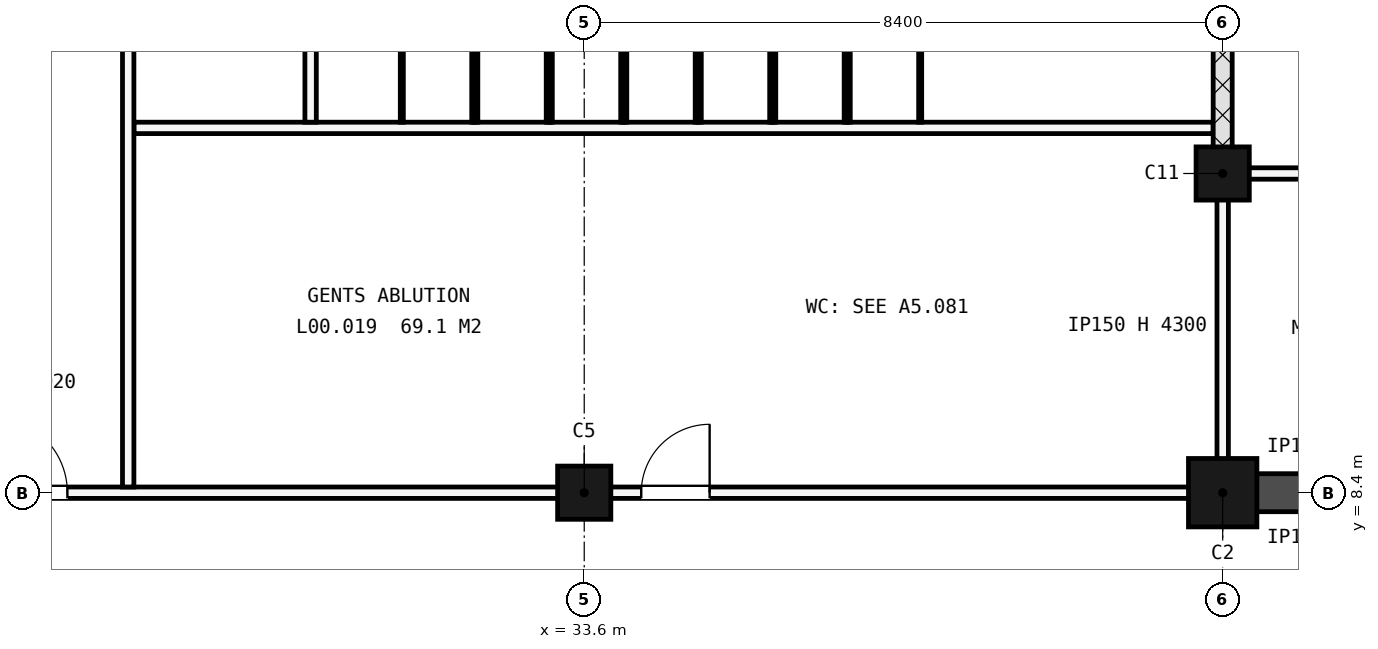
"""IFC4 building model, lengths in metres.
Left out: names, types, materials, properties, quantities, classifications, styles, units other than length and angle.
Written with IfcOpenShell. Run it as: python <this file> out.ifc"""

import sys

from ifc_helpers import new_model, si_unit, direction, frame, frame_2d, origin, origin_2d, place, context, subcontext, project, spatial, rectangle, circle, extrude, element, fill, save


model = new_model("IFC4")
c1 = context("Model", 3, precision=1e-05, world=origin(), true_north=direction((0.0, 1.0)))
c2 = subcontext(c1, "Body", "Model", "MODEL_VIEW")
j1 = project(units=[si_unit("LENGTHUNIT", "METRE"), si_unit("PLANEANGLEUNIT", "RADIAN")], contexts=[c1])
p1 = place(None, origin())
s1 = spatial("IfcSite", under=j1, at=p1, CompositionType="ELEMENT")
p2 = place(p1, origin())
s2 = spatial("IfcBuilding", under=s1, at=p2, CompositionType="ELEMENT")
p3 = place(p2, origin())
s3 = spatial("IfcBuildingStorey", under=s2, at=p3, CompositionType="ELEMENT", Elevation=0.0)
p4 = place(p3, frame((33.6, 8.4, -0.3), z_axis=(0.0, 0.0, 1.0), x_axis=(1.0, 0.0, 0.0)))
e1 = element("IfcColumn", 1, at=p4, inside=s3, PredefinedType="COLUMN", context=c2, shape_type="SweptSolid", body=[
    extrude(rectangle(XDim=0.7, YDim=0.7, at=origin_2d()), origin(), (0.0, 0.0, 1.0), 5.4),
])
p5 = place(p3, frame((42.0, 8.4, -0.3), z_axis=(0.0, 0.0, 1.0), x_axis=(1.0, 0.0, 0.0)))
e2 = element("IfcColumn", 2, at=p5, inside=s3, PredefinedType="COLUMN", context=c2, shape_type="SweptSolid", body=[
    extrude(rectangle(XDim=0.9, YDim=0.9, at=origin_2d()), origin(), (0.0, 0.0, 1.0), 5.4),
])
p6 = place(p3, frame((42.0, 12.6, -0.3), z_axis=(0.0, 0.0, 1.0), x_axis=(1.0, 0.0, 0.0)))
e3 = element("IfcColumn", 3, at=p6, inside=s3, PredefinedType="COLUMN", context=c2, shape_type="SweptSolid", body=[
    extrude(circle(Radius=0.35, at=origin_2d()), origin(), (0.0, 0.0, 1.0), 5.4),
])
p7 = place(p3, frame((42.0, 8.4, -0.3), z_axis=(0.0, 0.0, 1.0), x_axis=(1.0, 0.0, 0.0)))
e4 = element("IfcWall", 4, at=p7, inside=s3, PredefinedType="SHEAR", context=c2, shape_type="SweptSolid", body=[
    extrude(rectangle(XDim=42.0, YDim=0.5, at=frame_2d((21.0, 0.0))), origin(), (0.0, 0.0, 1.0), 5.4),
])
p8 = place(p7, frame((20.6, 0.0, 0.3)))
e5 = element("IfcOpeningElement", 5, at=p8, cuts=e4, PredefinedType="OPENING", context=c2, shape_type="SweptSolid", body=[
    extrude(rectangle(XDim=1.0, YDim=2.1, at=frame_2d((0.5, 1.05))), frame((0.0, 0.26, 0.0), z_axis=(0.0, -1.0, 0.0), x_axis=(1.0, 0.0, 0.0)), (0.0, 0.0, 1.0), 0.52),
])
p9 = place(p3, frame((25.2, 8.4, 0.0), z_axis=(0.0, 0.0, 1.0), x_axis=(1.0, 0.0, 0.0)))
e6 = element("IfcWall", 6, at=p9, inside=s3, PredefinedType="PARTITIONING", context=c2, shape_type="SweptSolid", body=[
    extrude(rectangle(XDim=16.875, YDim=0.15, at=frame_2d((8.438, 0.0))), origin(), (0.0, 0.0, 1.0), 4.3),
])
p10 = place(p9, frame((9.15, 0.0, 0.0)))
e7 = element("IfcOpeningElement", 7, at=p10, cuts=e6, PredefinedType="OPENING", context=c2, shape_type="SweptSolid", body=[
    extrude(rectangle(XDim=0.9, YDim=2.1, at=frame_2d((0.45, 1.05))), frame((0.0, 0.085, 0.0), z_axis=(0.0, -1.0, 0.0), x_axis=(1.0, 0.0, 0.0)), (0.0, 0.0, 1.0), 0.17),
])
p11 = place(p9, frame((0.6, 0.0, 0.0)))
e8 = element("IfcOpeningElement", 8, at=p11, cuts=e6, PredefinedType="OPENING", context=c2, shape_type="SweptSolid", body=[
    extrude(rectangle(XDim=1.0, YDim=2.1, at=frame_2d((0.5, 1.05))), frame((0.0, 0.085, 0.0), z_axis=(0.0, -1.0, 0.0), x_axis=(1.0, 0.0, 0.0)), (0.0, 0.0, 1.0), 0.17),
])
p12 = place(p3, frame((41.875, 12.6, 0.0), z_axis=(0.0, 0.0, 1.0), x_axis=(1.0, 0.0, 0.0)))
e9 = element("IfcWall", 9, at=p12, inside=s3, PredefinedType="PARTITIONING", context=c2, shape_type="SweptSolid", body=[
    extrude(rectangle(XDim=42.025, YDim=0.15, at=frame_2d((21.012, 0.0))), origin(), (0.0, 0.0, 1.0), 4.2),
])
p13 = place(p12, frame((19.925, 0.0, 0.0)))
e10 = element("IfcOpeningElement", 10, at=p13, cuts=e9, PredefinedType="OPENING", context=c2, shape_type="SweptSolid", body=[
    extrude(rectangle(XDim=2.4, YDim=2.1, at=frame_2d((1.2, 1.05))), frame((0.0, 0.085, 0.0), z_axis=(0.0, -1.0, 0.0), x_axis=(1.0, 0.0, 0.0)), (0.0, 0.0, 1.0), 0.17),
])
p14 = place(p3, frame((27.675, 13.2, 0.0), z_axis=(0.0, 0.0, 1.0), x_axis=(1.0, 0.0, 0.0)))
e11 = element("IfcWall", 11, at=p14, inside=s3, PredefinedType="PARTITIONING", context=c2, shape_type="SweptSolid", body=[
    extrude(rectangle(XDim=14.2, YDim=0.15, at=frame_2d((7.1, 0.0))), origin(), (0.0, 0.0, 1.0), 5.1),
])
p15 = place(p3, frame((27.6, 8.475, 0.0), z_axis=(0.0, 0.0, 1.0), x_axis=(0.0, 1.0, 0.0)))
e12 = element("IfcWall", 12, at=p15, inside=s3, PredefinedType="PARTITIONING", context=c2, shape_type="SweptSolid", body=[
    extrude(rectangle(XDim=16.825, YDim=0.15, at=frame_2d((8.413, 0.0))), origin(), (0.0, 0.0, 1.0), 5.1),
])
p16 = place(p15, frame((10.225, 0.0, 0.0)))
e13 = element("IfcOpeningElement", 13, at=p16, cuts=e12, PredefinedType="OPENING", context=c2, shape_type="SweptSolid", body=[
    extrude(rectangle(XDim=1.0, YDim=2.1, at=frame_2d((0.5, 1.05))), frame((0.0, 0.085, 0.0), z_axis=(0.0, -1.0, 0.0), x_axis=(1.0, 0.0, 0.0)), (0.0, 0.0, 1.0), 0.17),
])
p17 = place(p3, frame((30.0, 13.275, 0.0), z_axis=(0.0, 0.0, 1.0), x_axis=(0.0, 1.0, 0.0)))
e14 = element("IfcWall", 14, at=p17, inside=s3, PredefinedType="PARTITIONING", context=c2, shape_type="SweptSolid", body=[
    extrude(rectangle(XDim=11.825, YDim=0.15, at=frame_2d((5.913, 0.0))), origin(), (0.0, 0.0, 1.0), 5.1),
])
p18 = place(p17, frame((1.875, 0.0, 0.0)))
e15 = element("IfcOpeningElement", 15, at=p18, cuts=e14, PredefinedType="OPENING", context=c2, shape_type="SweptSolid", body=[
    extrude(rectangle(XDim=0.9, YDim=2.1, at=frame_2d((0.45, 1.05))), frame((0.0, 0.085, 0.0), z_axis=(0.0, -1.0, 0.0), x_axis=(1.0, 0.0, 0.0)), (0.0, 0.0, 1.0), 0.17),
])
p19 = place(p17, frame((6.575, 0.0, 0.0)))
e16 = element("IfcOpeningElement", 16, at=p19, cuts=e14, PredefinedType="OPENING", context=c2, shape_type="SweptSolid", body=[
    extrude(rectangle(XDim=0.9, YDim=2.1, at=frame_2d((0.45, 1.05))), frame((0.0, 0.085, 0.0), z_axis=(0.0, -1.0, 0.0), x_axis=(1.0, 0.0, 0.0)), (0.0, 0.0, 1.0), 0.17),
])
p20 = place(p17, frame((10.1, 0.0, 0.0)))
e17 = element("IfcOpeningElement", 17, at=p20, cuts=e14, PredefinedType="OPENING", context=c2, shape_type="SweptSolid", body=[
    extrude(rectangle(XDim=1.05, YDim=2.25, at=frame_2d((0.525, 1.125))), frame((0.0, 0.085, 0.0), z_axis=(0.0, -1.0, 0.0), x_axis=(1.0, 0.0, 0.0)), (0.0, 0.0, 1.0), 0.17),
])
p21 = place(p3, frame((42.0, 8.65, 0.0), z_axis=(0.0, 0.0, 1.0), x_axis=(0.0, 1.0, 0.0)))
e18 = element("IfcWall", 18, at=p21, inside=s3, PredefinedType="PARTITIONING", context=c2, shape_type="SweptSolid", body=[
    extrude(rectangle(XDim=3.875, YDim=0.15, at=frame_2d((1.938, 0.0))), origin(), (0.0, 0.0, 1.0), 4.3),
])
p22 = place(p3, frame((42.0, 12.675, 0.0), z_axis=(0.0, 0.0, 1.0), x_axis=(0.0, 1.0, 0.0)))
e19 = element("IfcWall", 19, at=p22, inside=s3, PredefinedType="SOLIDWALL", context=c2, shape_type="SweptSolid", body=[
    extrude(rectangle(XDim=4.555, YDim=0.25, at=frame_2d((2.277, 0.0))), origin(), (0.0, 0.0, 1.0), 4.3),
])
for number, where, z_axis, x_axis in (
    (20, (31.2, 13.275, 0.0), (0.0, 0.0, 1.0), (0.0, 1.0, 0.0)),
    (21, (32.14, 13.275, 0.0), (0.0, 0.0, 1.0), (0.0, 1.0, 0.0)),
    (22, (32.18, 13.275, 0.0), (0.0, 0.0, 1.0), (0.0, 1.0, 0.0)),
    (23, (33.12, 13.275, 0.0), (0.0, 0.0, 1.0), (0.0, 1.0, 0.0)),
    (24, (33.16, 13.275, 0.0), (0.0, 0.0, 1.0), (0.0, 1.0, 0.0)),
    (25, (34.1, 13.275, 0.0), (0.0, 0.0, 1.0), (0.0, 1.0, 0.0)),
    (26, (34.14, 13.275, 0.0), (0.0, 0.0, 1.0), (0.0, 1.0, 0.0)),
    (27, (35.08, 13.275, 0.0), (0.0, 0.0, 1.0), (0.0, 1.0, 0.0)),
    (28, (35.12, 13.275, 0.0), (0.0, 0.0, 1.0), (0.0, 1.0, 0.0)),
    (29, (36.06, 13.275, 0.0), (0.0, 0.0, 1.0), (0.0, 1.0, 0.0)),
    (30, (36.1, 13.275, 0.0), (0.0, 0.0, 1.0), (0.0, 1.0, 0.0)),
    (31, (37.04, 13.275, 0.0), (0.0, 0.0, 1.0), (0.0, 1.0, 0.0)),
    (32, (37.08, 13.275, 0.0), (0.0, 0.0, 1.0), (0.0, 1.0, 0.0)),
    (33, (38.02, 13.275, 0.0), (0.0, 0.0, 1.0), (0.0, 1.0, 0.0)),
):
    element("IfcWall", number, at=place(p3, frame(where, z_axis=z_axis, x_axis=x_axis)), inside=s3, PredefinedType="PARTITIONING", context=c2, shape_type="SweptSolid", body=[
        extrude(rectangle(XDim=1.595, YDim=0.04, at=frame_2d((0.798, 0.0))), origin(), (0.0, 0.0, 1.0), 2.0),
    ])
p23 = place(p10, origin())
e34 = element("IfcDoor", 34, at=p23, inside=s3, OperationType="SINGLE_SWING_LEFT", PredefinedType="DOOR", context=c2, shape_type="SweptSolid", body=[
    extrude(rectangle(XDim=0.9, YDim=2.1, at=frame_2d((0.45, 1.05))), frame((0.0, 0.025, 0.0), z_axis=(0.0, -1.0, 0.0), x_axis=(1.0, 0.0, 0.0)), (0.0, 0.0, 1.0), 0.05),
])
fill(e7, e34)
p24 = place(p11, origin())
e35 = element("IfcDoor", 35, at=p24, inside=s3, OperationType="SINGLE_SWING_RIGHT", PredefinedType="DOOR", context=c2, shape_type="SweptSolid", body=[
    extrude(rectangle(XDim=1.0, YDim=2.1, at=frame_2d((0.5, 1.05))), frame((0.0, 0.025, 0.0), z_axis=(0.0, -1.0, 0.0), x_axis=(1.0, 0.0, 0.0)), (0.0, 0.0, 1.0), 0.05),
])
fill(e8, e35)
save(model, sys.argv[1])
